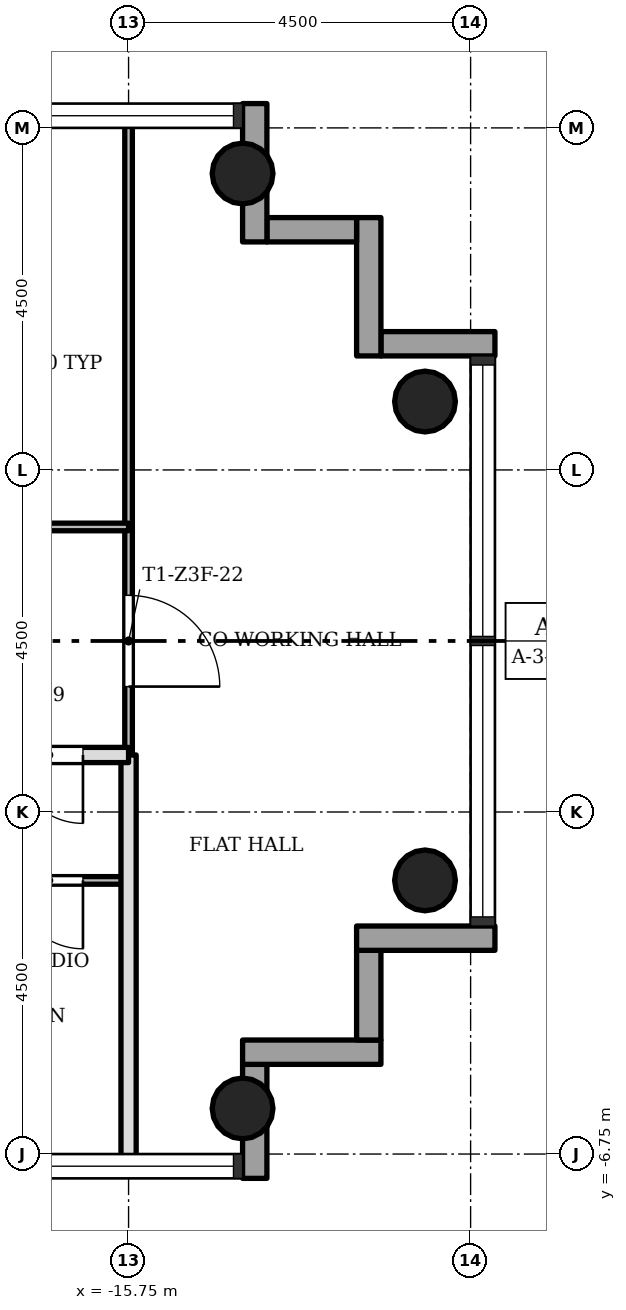
"""IFC4 building model, lengths in metres.
Left out: names, types, materials, properties, quantities, classifications, styles, units other than length and angle.
Written with IfcOpenShell. Run it as: python <this file> out.ifc"""

import sys

from ifc_helpers import new_model, si_unit, direction, frame, frame_2d, origin, origin_2d, place, context, subcontext, project, spatial, rectangle, hollow_circle, extrude, element, fill, save


model = new_model("IFC4")
c1 = context("Model", 3, precision=1e-05, world=origin(), true_north=direction((0.0, 1.0)))
c2 = subcontext(c1, "Body", "Model", "MODEL_VIEW")
j1 = project(units=[si_unit("LENGTHUNIT", "METRE"), si_unit("PLANEANGLEUNIT", "RADIAN")], contexts=[c1])
p1 = place(None, origin())
s1 = spatial("IfcSite", under=j1, at=p1, CompositionType="ELEMENT")
p2 = place(p1, origin())
s2 = spatial("IfcBuilding", under=s1, at=p2, CompositionType="ELEMENT")
p3 = place(p2, frame((0.0, 0.0, 167.7)))
s3 = spatial("IfcBuildingStorey", under=s2, at=p3, CompositionType="ELEMENT", Elevation=167.7)
for number, where, z_axis, x_axis in (
    (1, (-14.25, -6.15, 0.0), (0.0, 0.0, 1.0), (1.0, 0.0, 0.0)),
    (2, (-14.25, 6.15, 0.0), (0.0, 0.0, 1.0), (1.0, 0.0, 0.0)),
    (3, (-11.85, -3.15, 0.0), (0.0, 0.0, 1.0), (1.0, 0.0, 0.0)),
    (4, (-11.85, 3.15, 0.0), (0.0, 0.0, 1.0), (1.0, 0.0, 0.0)),
):
    element("IfcColumn", number, at=place(p3, frame(where, z_axis=z_axis, x_axis=x_axis)), inside=s3, PredefinedType="COLUMN", context=c2, shape_type="SweptSolid", body=[
        extrude(hollow_circle(Radius=0.4, WallThickness=0.028, at=origin_2d()), origin(), (0.0, 0.0, 1.0), 3.4),
    ])
p4 = place(p3, frame((-14.09, -7.07, -0.3), z_axis=(0.0, 0.0, 1.0), x_axis=(0.0, 1.0, 0.0)))
e5 = element("IfcWall", 5, at=p4, inside=s3, PredefinedType="STANDARD", context=c2, shape_type="SweptSolid", body=[
    extrude(rectangle(XDim=1.5, YDim=0.32, at=frame_2d((0.75, 0.0))), origin(), (0.0, 0.0, 1.0), 3.4),
])
p5 = place(p3, frame((-14.25, -5.41, -0.3), z_axis=(0.0, 0.0, 1.0), x_axis=(1.0, 0.0, 0.0)))
e6 = element("IfcWall", 6, at=p5, inside=s3, PredefinedType="STANDARD", context=c2, shape_type="SweptSolid", body=[
    extrude(rectangle(XDim=1.82, YDim=0.32, at=frame_2d((0.91, 0.0))), origin(), (0.0, 0.0, 1.0), 3.4),
])
p6 = place(p3, frame((-12.59, -5.25, -0.3), z_axis=(0.0, 0.0, 1.0), x_axis=(0.0, 1.0, 0.0)))
e7 = element("IfcWall", 7, at=p6, inside=s3, PredefinedType="STANDARD", context=c2, shape_type="SweptSolid", body=[
    extrude(rectangle(XDim=1.18, YDim=0.32, at=frame_2d((0.59, 0.0))), origin(), (0.0, 0.0, 1.0), 3.4),
])
p7 = place(p3, frame((-12.75, -3.91, -0.3), z_axis=(0.0, 0.0, 1.0), x_axis=(1.0, 0.0, 0.0)))
e8 = element("IfcWall", 8, at=p7, inside=s3, PredefinedType="STANDARD", context=c2, shape_type="SweptSolid", body=[
    extrude(rectangle(XDim=1.82, YDim=0.32, at=frame_2d((0.91, 0.0))), origin(), (0.0, 0.0, 1.0), 3.4),
])
p8 = place(p3, frame((-10.93, 3.91, -0.3), z_axis=(0.0, 0.0, 1.0), x_axis=(-1.0, 0.0, 0.0)))
e9 = element("IfcWall", 9, at=p8, inside=s3, PredefinedType="STANDARD", context=c2, shape_type="SweptSolid", body=[
    extrude(rectangle(XDim=1.5, YDim=0.32, at=frame_2d((0.75, 0.0))), origin(), (0.0, 0.0, 1.0), 3.4),
])
p9 = place(p3, frame((-12.59, 3.75, -0.3), z_axis=(0.0, 0.0, 1.0), x_axis=(0.0, 1.0, 0.0)))
e10 = element("IfcWall", 10, at=p9, inside=s3, PredefinedType="STANDARD", context=c2, shape_type="SweptSolid", body=[
    extrude(rectangle(XDim=1.82, YDim=0.32, at=frame_2d((0.91, 0.0))), origin(), (0.0, 0.0, 1.0), 3.4),
])
p10 = place(p3, frame((-12.75, 5.41, -0.3), z_axis=(0.0, 0.0, 1.0), x_axis=(-1.0, 0.0, 0.0)))
e11 = element("IfcWall", 11, at=p10, inside=s3, PredefinedType="STANDARD", context=c2, shape_type="SweptSolid", body=[
    extrude(rectangle(XDim=1.18, YDim=0.32, at=frame_2d((0.59, 0.0))), origin(), (0.0, 0.0, 1.0), 3.4),
])
p11 = place(p3, frame((-14.09, 5.25, -0.3), z_axis=(0.0, 0.0, 1.0), x_axis=(0.0, 1.0, 0.0)))
e12 = element("IfcWall", 12, at=p11, inside=s3, PredefinedType="STANDARD", context=c2, shape_type="SweptSolid", body=[
    extrude(rectangle(XDim=1.82, YDim=0.32, at=frame_2d((0.91, 0.0))), origin(), (0.0, 0.0, 1.0), 3.4),
])
p12 = place(p3, frame((-15.75, -1.5, 0.0), z_axis=(0.0, 0.0, 1.0), x_axis=(0.0, 1.0, 0.0)))
e13 = element("IfcWall", 13, at=p12, inside=s3, PredefinedType="PARTITIONING", context=c2, shape_type="SweptSolid", body=[
    extrude(rectangle(XDim=8.35, YDim=0.1, at=frame_2d((4.175, 0.0))), origin(), (0.0, 0.0, 1.0), 3.0),
])
p13 = place(p12, frame((0.9, 0.0, 0.0)))
e14 = element("IfcOpeningElement", 14, at=p13, cuts=e13, PredefinedType="OPENING", context=c2, shape_type="SweptSolid", body=[
    extrude(rectangle(XDim=1.2, YDim=2.1, at=frame_2d((0.6, 1.05))), frame((0.0, 0.06, 0.0), z_axis=(0.0, -1.0, 0.0), x_axis=(1.0, 0.0, 0.0)), (0.0, 0.0, 1.0), 0.12),
])
p14 = place(p3, frame((-15.75, -6.85, 0.0), z_axis=(0.0, 0.0, 1.0), x_axis=(0.0, 1.0, 0.0)))
e15 = element("IfcWall", 15, at=p14, inside=s3, PredefinedType="SOLIDWALL", context=c2, shape_type="SweptSolid", body=[
    extrude(rectangle(XDim=5.35, YDim=0.2, at=frame_2d((2.675, 0.0))), origin(), (0.0, 0.0, 1.0), 3.0),
])
p15 = place(p3, frame((-20.25, -3.15, 0.0), z_axis=(0.0, 0.0, 1.0), x_axis=(1.0, 0.0, 0.0)))
e16 = element("IfcWall", 16, at=p15, inside=s3, PredefinedType="PARTITIONING", context=c2, shape_type="SweptSolid", body=[
    extrude(rectangle(XDim=4.5, YDim=0.1, at=frame_2d((2.25, 0.0))), origin(), (0.0, 0.0, 1.0), 3.0),
])
p16 = place(p15, frame((3.0, 0.0, 0.0)))
e17 = element("IfcOpeningElement", 17, at=p16, cuts=e16, PredefinedType="OPENING", context=c2, shape_type="SweptSolid", body=[
    extrude(rectangle(XDim=0.9, YDim=2.1, at=frame_2d((0.45, 1.05))), frame((0.0, 0.06, 0.0), z_axis=(0.0, -1.0, 0.0), x_axis=(1.0, 0.0, 0.0)), (0.0, 0.0, 1.0), 0.12),
])
p17 = place(p3, frame((-20.25, -1.5, 0.0), z_axis=(0.0, 0.0, 1.0), x_axis=(1.0, 0.0, 0.0)))
e18 = element("IfcWall", 18, at=p17, inside=s3, PredefinedType="SOLIDWALL", context=c2, shape_type="SweptSolid", body=[
    extrude(rectangle(XDim=4.5, YDim=0.2, at=frame_2d((2.25, 0.0))), origin(), (0.0, 0.0, 1.0), 3.0),
])
p18 = place(p17, frame((3.0, 0.0, 0.0)))
e19 = element("IfcOpeningElement", 19, at=p18, cuts=e18, PredefinedType="OPENING", context=c2, shape_type="SweptSolid", body=[
    extrude(rectangle(XDim=0.9, YDim=2.1, at=frame_2d((0.45, 1.05))), frame((0.0, 0.11, 0.0), z_axis=(0.0, -1.0, 0.0), x_axis=(1.0, 0.0, 0.0)), (0.0, 0.0, 1.0), 0.22),
])
p19 = place(p3, frame((-20.25, 1.5, 0.0), z_axis=(0.0, 0.0, 1.0), x_axis=(1.0, 0.0, 0.0)))
e20 = element("IfcWall", 20, at=p19, inside=s3, PredefinedType="PARTITIONING", context=c2, shape_type="SweptSolid", body=[
    extrude(rectangle(XDim=4.5, YDim=0.1, at=frame_2d((2.25, 0.0))), origin(), (0.0, 0.0, 1.0), 3.0),
])
p20 = place(p19, frame((1.8, 0.0, 0.0)))
e21 = element("IfcOpeningElement", 21, at=p20, cuts=e20, PredefinedType="OPENING", context=c2, shape_type="SweptSolid", body=[
    extrude(rectangle(XDim=0.9, YDim=2.1, at=frame_2d((0.45, 1.05))), frame((0.0, 0.06, 0.0), z_axis=(0.0, -1.0, 0.0), x_axis=(1.0, 0.0, 0.0)), (0.0, 0.0, 1.0), 0.12),
])
p21 = place(p18, origin())
e22 = element("IfcDoor", 22, at=p21, inside=s3, OperationType="SINGLE_SWING_RIGHT", PredefinedType="DOOR", context=c2, shape_type="SweptSolid", body=[
    extrude(rectangle(XDim=0.9, YDim=2.1, at=frame_2d((0.45, 1.05))), frame((0.0, 0.025, 0.0), z_axis=(0.0, -1.0, 0.0), x_axis=(1.0, 0.0, 0.0)), (0.0, 0.0, 1.0), 0.05),
])
fill(e19, e22)
p22 = place(p16, origin())
e23 = element("IfcDoor", 23, at=p22, inside=s3, OperationType="SINGLE_SWING_RIGHT", PredefinedType="DOOR", context=c2, shape_type="SweptSolid", body=[
    extrude(rectangle(XDim=0.9, YDim=2.1, at=frame_2d((0.45, 1.05))), frame((0.0, 0.025, 0.0), z_axis=(0.0, -1.0, 0.0), x_axis=(1.0, 0.0, 0.0)), (0.0, 0.0, 1.0), 0.05),
])
fill(e17, e23)
p23 = place(p13, origin())
e24 = element("IfcDoor", 24, at=p23, inside=s3, OperationType="SINGLE_SWING_LEFT", PredefinedType="DOOR", context=c2, shape_type="SweptSolid", body=[
    extrude(rectangle(XDim=1.2, YDim=2.1, at=frame_2d((0.6, 1.05))), frame((0.0, 0.025, 0.0), z_axis=(0.0, -1.0, 0.0), x_axis=(1.0, 0.0, 0.0)), (0.0, 0.0, 1.0), 0.05),
])
fill(e14, e24)
save(model, sys.argv[1])
